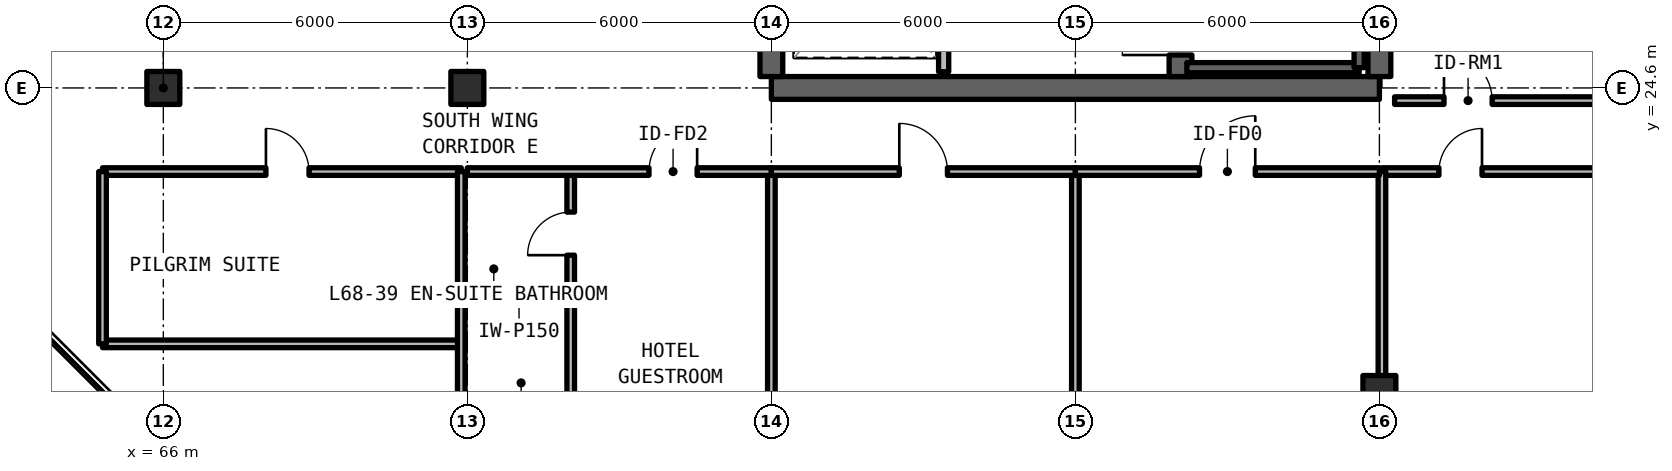
"""IFC4 building model, lengths in metres.
Left out: names, types, materials, properties, quantities, classifications, styles, units other than length and angle.
Written with IfcOpenShell. Run it as: python <this file> out.ifc"""

import sys

from ifc_helpers import new_model, si_unit, direction, frame, frame_2d, origin, origin_2d, place, context, subcontext, project, spatial, rectangle, extrude, element, fill, save


model = new_model("IFC4")
c1 = context("Model", 3, precision=1e-05, world=origin(), true_north=direction((0.0, 1.0)))
c2 = subcontext(c1, "Body", "Model", "MODEL_VIEW")
j1 = project(units=[si_unit("LENGTHUNIT", "METRE"), si_unit("PLANEANGLEUNIT", "RADIAN")], contexts=[c1])
p1 = place(None, origin())
s1 = spatial("IfcSite", under=j1, at=p1, CompositionType="ELEMENT")
p2 = place(p1, origin())
s2 = spatial("IfcBuilding", under=s1, at=p2, CompositionType="ELEMENT")
p3 = place(p2, frame((0.0, 0.0, 242.55)))
s3 = spatial("IfcBuildingStorey", under=s2, at=p3, CompositionType="ELEMENT", Elevation=242.55)
p4 = place(p3, frame((78.0, 24.6, 0.0), z_axis=(0.0, 0.0, 1.0), x_axis=(1.0, 0.0, 0.0)))
e1 = element("IfcWall", 1, at=p4, inside=s3, PredefinedType="SHEAR", context=c2, shape_type="SweptSolid", body=[
    extrude(rectangle(XDim=12.0, YDim=0.45, at=frame_2d((6.0, 0.0))), origin(), (0.0, 0.0, 1.0), 3.63),
])
p5 = place(p3, frame((90.0, 24.825, 0.0), z_axis=(0.0, 0.0, 1.0), x_axis=(0.0, 1.0, 0.0)))
e2 = element("IfcWall", 2, at=p5, inside=s3, PredefinedType="SHEAR", context=c2, shape_type="SweptSolid", body=[
    extrude(rectangle(XDim=17.55, YDim=0.45, at=frame_2d((8.775, 0.0))), origin(), (0.0, 0.0, 1.0), 3.63),
])
p6 = place(p3, frame((78.0, 24.825, 0.0), z_axis=(0.0, 0.0, 1.0), x_axis=(0.0, 1.0, 0.0)))
e3 = element("IfcWall", 3, at=p6, inside=s3, PredefinedType="SHEAR", context=c2, shape_type="SweptSolid", body=[
    extrude(rectangle(XDim=8.975, YDim=0.45, at=frame_2d((4.488, 0.0))), origin(), (0.0, 0.0, 1.0), 3.63),
])
p7 = place(p3, frame((86.075, 24.825, 0.0), z_axis=(0.0, 0.0, 1.0), x_axis=(0.0, 1.0, 0.0)))
e4 = element("IfcWall", 4, at=p7, inside=s3, PredefinedType="SHEAR", context=c2, shape_type="SweptSolid", body=[
    extrude(rectangle(XDim=17.55, YDim=0.45, at=frame_2d((8.775, 0.0))), origin(), (0.0, 0.0, 1.0), 3.63),
])
p8 = place(p7, frame((0.425, 0.0, 0.0)))
e5 = element("IfcOpeningElement", 5, at=p8, cuts=e4, PredefinedType="OPENING", context=c2, shape_type="SweptSolid", body=[
    extrude(rectangle(XDim=1.15, YDim=2.15, at=frame_2d((0.575, 1.075))), frame((0.0, 0.235, 0.0), z_axis=(0.0, -1.0, 0.0), x_axis=(1.0, 0.0, 0.0)), (0.0, 0.0, 1.0), 0.47),
])
p9 = place(p7, frame((9.625, 0.0, 0.0)))
e6 = element("IfcOpeningElement", 6, at=p9, cuts=e4, PredefinedType="OPENING", context=c2, shape_type="SweptSolid", body=[
    extrude(rectangle(XDim=1.15, YDim=2.15, at=frame_2d((0.575, 1.075))), frame((0.0, 0.235, 0.0), z_axis=(0.0, -1.0, 0.0), x_axis=(1.0, 0.0, 0.0)), (0.0, 0.0, 1.0), 0.47),
])
for number, where, z_axis, x_axis in (
    (7, (66.0, 24.6, 0.0), (0.0, 0.0, 1.0), (1.0, 0.0, 0.0)),
    (8, (72.0, 24.6, 0.0), (0.0, 0.0, 1.0), (1.0, 0.0, 0.0)),
    (9, (90.0, 18.6, 0.0), (0.0, 0.0, 1.0), (1.0, 0.0, 0.0)),
):
    element("IfcColumn", number, at=place(p3, frame(where, z_axis=z_axis, x_axis=x_axis)), inside=s3, PredefinedType="COLUMN", context=c2, shape_type="SweptSolid", body=[
        extrude(rectangle(XDim=0.65, YDim=0.65, at=origin_2d()), origin(), (0.0, 0.0, 1.0), 3.63),
    ])
p10 = place(p3, frame((81.4, 24.92, 0.0), z_axis=(0.0, 0.0, 1.0), x_axis=(0.0, 1.0, 0.0)))
e10 = element("IfcWall", 10, at=p10, inside=s3, PredefinedType="SOLIDWALL", context=c2, shape_type="SweptSolid", body=[
    extrude(rectangle(XDim=3.58, YDim=0.2, at=frame_2d((1.79, 0.0))), origin(), (0.0, 0.0, 1.0), 2.63),
])
p11 = place(p10, frame((1.3, 0.0, 0.0)))
e11 = element("IfcOpeningElement", 11, at=p11, cuts=e10, PredefinedType="OPENING", context=c2, shape_type="SweptSolid", body=[
    extrude(rectangle(XDim=1.1, YDim=2.2, at=frame_2d((0.55, 1.1))), frame((0.0, 0.11, 0.0), z_axis=(0.0, -1.0, 0.0), x_axis=(1.0, 0.0, 0.0)), (0.0, 0.0, 1.0), 0.22),
])
p12 = place(p3, frame((64.8, 19.55, 0.0), z_axis=(0.0, 0.0, 1.0), x_axis=(1.0, 0.0, 0.0)))
e12 = element("IfcWall", 12, at=p12, inside=s3, PredefinedType="SOLIDWALL", context=c2, shape_type="SweptSolid", body=[
    extrude(rectangle(XDim=7.08, YDim=0.15, at=frame_2d((3.54, 0.0))), origin(), (0.0, 0.0, 1.0), 2.63),
])
p13 = place(p3, frame((64.8, 22.95, 0.0), z_axis=(0.0, 0.0, 1.0), x_axis=(1.0, 0.0, 0.0)))
e13 = element("IfcWall", 13, at=p13, inside=s3, PredefinedType="SOLIDWALL", context=c2, shape_type="SweptSolid", body=[
    extrude(rectangle(XDim=7.08, YDim=0.15, at=frame_2d((3.54, 0.0))), origin(), (0.0, 0.0, 1.0), 2.63),
])
p14 = place(p13, frame((3.225, 0.0, 0.0)))
e14 = element("IfcOpeningElement", 14, at=p14, cuts=e13, PredefinedType="OPENING", context=c2, shape_type="SweptSolid", body=[
    extrude(rectangle(XDim=0.85, YDim=2.1, at=frame_2d((0.425, 1.05))), frame((0.0, 0.085, 0.0), z_axis=(0.0, -1.0, 0.0), x_axis=(1.0, 0.0, 0.0)), (0.0, 0.0, 1.0), 0.17),
])
p15 = place(p3, frame((64.8, 19.55, 0.0), z_axis=(0.0, 0.0, 1.0), x_axis=(0.0, 1.0, 0.0)))
e15 = element("IfcWall", 15, at=p15, inside=s3, PredefinedType="SOLIDWALL", context=c2, shape_type="SweptSolid", body=[
    extrude(rectangle(XDim=3.4, YDim=0.15, at=frame_2d((1.7, 0.0))), origin(), (0.0, 0.0, 1.0), 2.63),
])
p16 = place(p3, frame((71.88, 12.34, 0.0), z_axis=(0.0, 0.0, 1.0), x_axis=(0.0, 1.0, 0.0)))
e16 = element("IfcWall", 16, at=p16, inside=s3, PredefinedType="SOLIDWALL", context=c2, shape_type="SweptSolid", body=[
    extrude(rectangle(XDim=10.61, YDim=0.15, at=frame_2d((5.305, 0.0))), origin(), (0.0, 0.0, 1.0), 2.63),
])
p17 = place(p3, frame((90.3, 24.35, 0.0), z_axis=(0.0, 0.0, 1.0), x_axis=(1.0, 0.0, 0.0)))
e17 = element("IfcWall", 17, at=p17, inside=s3, PredefinedType="SOLIDWALL", context=c2, shape_type="SweptSolid", body=[
    extrude(rectangle(XDim=8.52, YDim=0.15, at=frame_2d((4.26, 0.0))), origin(), (0.0, 0.0, 1.0), 2.63),
])
p18 = place(p17, frame((0.975, 0.0, 0.0)))
e18 = element("IfcOpeningElement", 18, at=p18, cuts=e17, PredefinedType="OPENING", context=c2, shape_type="SweptSolid", body=[
    extrude(rectangle(XDim=0.95, YDim=2.15, at=frame_2d((0.475, 1.075))), frame((0.0, 0.085, 0.0), z_axis=(0.0, -1.0, 0.0), x_axis=(1.0, 0.0, 0.0)), (0.0, 0.0, 1.0), 0.17),
])
p19 = place(p3, frame((90.05, 22.95, 0.0), z_axis=(0.0, 0.0, 1.0), x_axis=(1.0, 0.0, 0.0)))
e19 = element("IfcWall", 19, at=p19, inside=s3, PredefinedType="SOLIDWALL", context=c2, shape_type="SweptSolid", body=[
    extrude(rectangle(XDim=5.37, YDim=0.15, at=frame_2d((2.685, 0.0))), origin(), (0.0, 0.0, 1.0), 2.63),
])
p20 = place(p19, frame((1.125, 0.0, 0.0)))
e20 = element("IfcOpeningElement", 20, at=p20, cuts=e19, PredefinedType="OPENING", context=c2, shape_type="SweptSolid", body=[
    extrude(rectangle(XDim=0.85, YDim=2.1, at=frame_2d((0.425, 1.05))), frame((0.0, 0.085, 0.0), z_axis=(0.0, -1.0, 0.0), x_axis=(1.0, 0.0, 0.0)), (0.0, 0.0, 1.0), 0.17),
])
for number, where, z_axis, x_axis in (
    (21, (90.05, 12.34, 0.0), (0.0, 0.0, 1.0), (0.0, 1.0, 0.0)),
    (22, (78.0, 12.34, 0.0), (0.0, 0.0, 1.0), (0.0, 1.0, 0.0)),
):
    element("IfcWall", number, at=place(p3, frame(where, z_axis=z_axis, x_axis=x_axis)), inside=s3, PredefinedType="SOLIDWALL", context=c2, shape_type="SweptSolid", body=[
        extrude(rectangle(XDim=10.61, YDim=0.15, at=frame_2d((5.305, 0.0))), origin(), (0.0, 0.0, 1.0), 2.63),
    ])
p21 = place(p3, frame((72.0, 20.5, 0.0), z_axis=(0.0, 0.0, 1.0), x_axis=(1.0, 0.0, 0.0)))
e23 = element("IfcWall", 23, at=p21, inside=s3, PredefinedType="PARTITIONING", context=c2, shape_type="SweptSolid", body=[
    extrude(rectangle(XDim=2.04, YDim=0.15, at=frame_2d((1.02, 0.0))), origin(), (0.0, 0.0, 1.0), 2.63),
])
p22 = place(p3, frame((74.04, 12.34, 0.0), z_axis=(0.0, 0.0, 1.0), x_axis=(0.0, 1.0, 0.0)))
e24 = element("IfcWall", 24, at=p22, inside=s3, PredefinedType="PARTITIONING", context=c2, shape_type="SweptSolid", body=[
    extrude(rectangle(XDim=10.61, YDim=0.15, at=frame_2d((5.305, 0.0))), origin(), (0.0, 0.0, 1.0), 2.63),
])
p23 = place(p22, frame((3.124, 0.0, 0.0)))
e25 = element("IfcOpeningElement", 25, at=p23, cuts=e24, PredefinedType="OPENING", context=c2, shape_type="SweptSolid", body=[
    extrude(rectangle(XDim=0.85, YDim=2.1, at=frame_2d((0.425, 1.05))), frame((0.0, 0.085, 0.0), z_axis=(0.0, -1.0, 0.0), x_axis=(1.0, 0.0, 0.0)), (0.0, 0.0, 1.0), 0.17),
])
p24 = place(p22, frame((8.96, 0.0, 0.0)))
e26 = element("IfcOpeningElement", 26, at=p24, cuts=e24, PredefinedType="OPENING", context=c2, shape_type="SweptSolid", body=[
    extrude(rectangle(XDim=0.85, YDim=2.1, at=frame_2d((0.425, 1.05))), frame((0.0, 0.085, 0.0), z_axis=(0.0, -1.0, 0.0), x_axis=(1.0, 0.0, 0.0)), (0.0, 0.0, 1.0), 0.17),
])
p25 = place(p3, frame((72.0, 22.95, 0.0), z_axis=(0.0, 0.0, 1.0), x_axis=(1.0, 0.0, 0.0)))
e27 = element("IfcWall", 27, at=p25, inside=s3, PredefinedType="SOLIDWALL", context=c2, shape_type="SweptSolid", body=[
    extrude(rectangle(XDim=6.0, YDim=0.15, at=frame_2d((3.0, 0.0))), origin(), (0.0, 0.0, 1.0), 2.63),
])
p26 = place(p25, frame((3.585, 0.0, 0.0)))
e28 = element("IfcOpeningElement", 28, at=p26, cuts=e27, PredefinedType="OPENING", context=c2, shape_type="SweptSolid", body=[
    extrude(rectangle(XDim=0.95, YDim=2.15, at=frame_2d((0.475, 1.075))), frame((0.0, 0.085, 0.0), z_axis=(0.0, -1.0, 0.0), x_axis=(1.0, 0.0, 0.0)), (0.0, 0.0, 1.0), 0.17),
])
p27 = place(p3, frame((84.0, 12.34, 0.0), z_axis=(0.0, 0.0, 1.0), x_axis=(0.0, 1.0, 0.0)))
e29 = element("IfcWall", 29, at=p27, inside=s3, PredefinedType="SOLIDWALL", context=c2, shape_type="SweptSolid", body=[
    extrude(rectangle(XDim=10.61, YDim=0.15, at=frame_2d((5.305, 0.0))), origin(), (0.0, 0.0, 1.0), 2.63),
])
p28 = place(p3, frame((78.0, 22.95, 0.0), z_axis=(0.0, 0.0, 1.0), x_axis=(1.0, 0.0, 0.0)))
e30 = element("IfcWall", 30, at=p28, inside=s3, PredefinedType="SOLIDWALL", context=c2, shape_type="SweptSolid", body=[
    extrude(rectangle(XDim=6.0, YDim=0.15, at=frame_2d((3.0, 0.0))), origin(), (0.0, 0.0, 1.0), 2.63),
])
p29 = place(p28, frame((2.525, 0.0, 0.0)))
e31 = element("IfcOpeningElement", 31, at=p29, cuts=e30, PredefinedType="OPENING", context=c2, shape_type="SweptSolid", body=[
    extrude(rectangle(XDim=0.95, YDim=2.15, at=frame_2d((0.475, 1.075))), frame((0.0, 0.085, 0.0), z_axis=(0.0, -1.0, 0.0), x_axis=(1.0, 0.0, 0.0)), (0.0, 0.0, 1.0), 0.17),
])
p30 = place(p3, frame((84.0, 22.95, 0.0), z_axis=(0.0, 0.0, 1.0), x_axis=(1.0, 0.0, 0.0)))
e32 = element("IfcWall", 32, at=p30, inside=s3, PredefinedType="SOLIDWALL", context=c2, shape_type="SweptSolid", body=[
    extrude(rectangle(XDim=6.0, YDim=0.15, at=frame_2d((3.0, 0.0))), origin(), (0.0, 0.0, 1.0), 2.63),
])
p31 = place(p30, frame((2.45, 0.0, 0.0)))
e33 = element("IfcOpeningElement", 33, at=p31, cuts=e32, PredefinedType="OPENING", context=c2, shape_type="SweptSolid", body=[
    extrude(rectangle(XDim=1.1, YDim=2.15, at=frame_2d((0.55, 1.075))), frame((0.0, 0.085, 0.0), z_axis=(0.0, -1.0, 0.0), x_axis=(1.0, 0.0, 0.0)), (0.0, 0.0, 1.0), 0.17),
])
p32 = place(p3, frame((86.2, 25.0, 0.0), z_axis=(0.0, 0.0, 1.0), x_axis=(1.0, 0.0, 0.0)))
e34 = element("IfcWall", 34, at=p32, inside=s3, PredefinedType="SOLIDWALL", context=c2, shape_type="SweptSolid", body=[
    extrude(rectangle(XDim=3.4, YDim=0.2, at=frame_2d((1.7, 0.0))), origin(), (0.0, 0.0, 1.0), 3.63),
])
p33 = place(p3, frame((89.6, 25.0, 0.0), z_axis=(0.0, 0.0, 1.0), x_axis=(0.0, 1.0, 0.0)))
e35 = element("IfcWall", 35, at=p33, inside=s3, PredefinedType="SOLIDWALL", context=c2, shape_type="SweptSolid", body=[
    extrude(rectangle(XDim=8.0, YDim=0.2, at=frame_2d((4.0, 0.0))), origin(), (0.0, 0.0, 1.0), 3.63),
])
p34 = place(p14, origin())
e36 = element("IfcDoor", 36, at=p34, inside=s3, OperationType="SINGLE_SWING_LEFT", PredefinedType="DOOR", context=c2, shape_type="SweptSolid", body=[
    extrude(rectangle(XDim=0.85, YDim=2.1, at=frame_2d((0.425, 1.05))), frame((0.0, 0.025, 0.0), z_axis=(0.0, -1.0, 0.0), x_axis=(1.0, 0.0, 0.0)), (0.0, 0.0, 1.0), 0.05),
])
fill(e14, e36)
p35 = place(p18, origin())
e37 = element("IfcDoor", 37, at=p35, inside=s3, OperationType="SINGLE_SWING_LEFT", PredefinedType="DOOR", context=c2, shape_type="SweptSolid", body=[
    extrude(rectangle(XDim=0.95, YDim=2.15, at=frame_2d((0.475, 1.075))), frame((0.0, 0.025, 0.0), z_axis=(0.0, -1.0, 0.0), x_axis=(1.0, 0.0, 0.0)), (0.0, 0.0, 1.0), 0.05),
])
fill(e18, e37)
p36 = place(p20, origin())
e38 = element("IfcDoor", 38, at=p36, inside=s3, OperationType="SINGLE_SWING_RIGHT", PredefinedType="DOOR", context=c2, shape_type="SweptSolid", body=[
    extrude(rectangle(XDim=0.85, YDim=2.1, at=frame_2d((0.425, 1.05))), frame((0.0, 0.025, 0.0), z_axis=(0.0, -1.0, 0.0), x_axis=(1.0, 0.0, 0.0)), (0.0, 0.0, 1.0), 0.05),
])
fill(e20, e38)
p37 = place(p24, origin())
e39 = element("IfcDoor", 39, at=p37, inside=s3, OperationType="SINGLE_SWING_LEFT", PredefinedType="DOOR", context=c2, shape_type="SweptSolid", body=[
    extrude(rectangle(XDim=0.85, YDim=2.1, at=frame_2d((0.425, 1.05))), frame((0.0, 0.025, 0.0), z_axis=(0.0, -1.0, 0.0), x_axis=(1.0, 0.0, 0.0)), (0.0, 0.0, 1.0), 0.05),
])
fill(e26, e39)
p38 = place(p26, origin())
e40 = element("IfcDoor", 40, at=p38, inside=s3, OperationType="SINGLE_SWING_RIGHT", PredefinedType="DOOR", context=c2, shape_type="SweptSolid", body=[
    extrude(rectangle(XDim=0.95, YDim=2.15, at=frame_2d((0.475, 1.075))), frame((0.0, 0.025, 0.0), z_axis=(0.0, -1.0, 0.0), x_axis=(1.0, 0.0, 0.0)), (0.0, 0.0, 1.0), 0.05),
])
fill(e28, e40)
p39 = place(p29, origin())
e41 = element("IfcDoor", 41, at=p39, inside=s3, OperationType="SINGLE_SWING_LEFT", PredefinedType="DOOR", context=c2, shape_type="SweptSolid", body=[
    extrude(rectangle(XDim=0.95, YDim=2.15, at=frame_2d((0.475, 1.075))), frame((0.0, 0.025, 0.0), z_axis=(0.0, -1.0, 0.0), x_axis=(1.0, 0.0, 0.0)), (0.0, 0.0, 1.0), 0.05),
])
fill(e31, e41)
p40 = place(p31, origin())
e42 = element("IfcDoor", 42, at=p40, inside=s3, OperationType="SINGLE_SWING_RIGHT", PredefinedType="DOOR", context=c2, shape_type="SweptSolid", body=[
    extrude(rectangle(XDim=1.1, YDim=2.15, at=frame_2d((0.55, 1.075))), frame((0.0, 0.025, 0.0), z_axis=(0.0, -1.0, 0.0), x_axis=(1.0, 0.0, 0.0)), (0.0, 0.0, 1.0), 0.05),
])
fill(e33, e42)
p41 = place(p8, origin())
e43 = element("IfcDoor", 43, at=p41, inside=s3, OperationType="SINGLE_SWING_LEFT", PredefinedType="DOOR", context=c2, shape_type="SweptSolid", body=[
    extrude(rectangle(XDim=1.15, YDim=2.15, at=frame_2d((0.575, 1.075))), frame((0.0, 0.025, 0.0), z_axis=(0.0, -1.0, 0.0), x_axis=(1.0, 0.0, 0.0)), (0.0, 0.0, 1.0), 0.05),
])
fill(e5, e43)
save(model, sys.argv[1])
